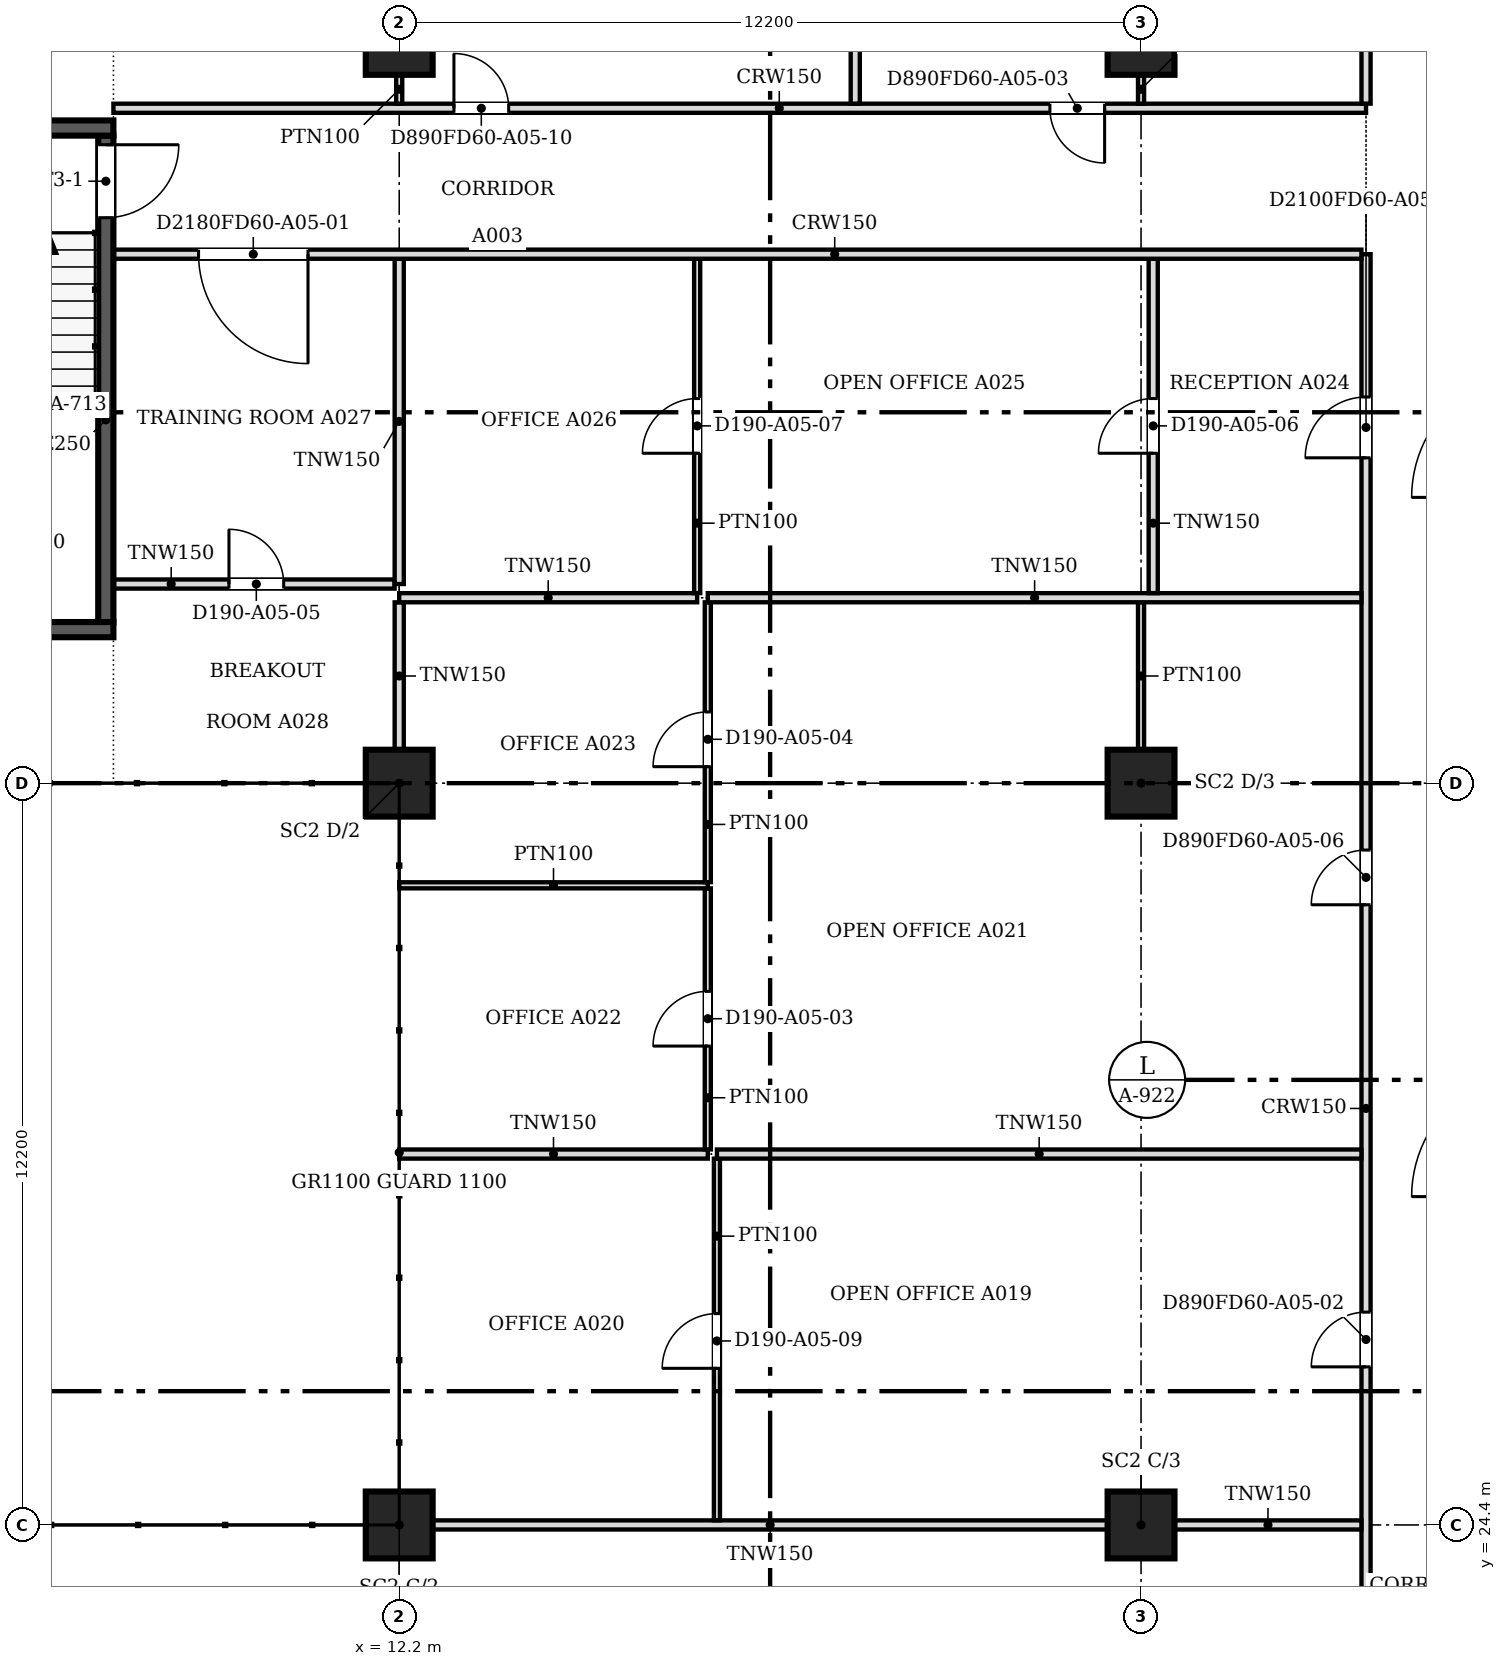
"""IFC4 building model, lengths in metres.
Left out: names, types, materials, properties, quantities, classifications, styles, units other than length and angle.
Written with IfcOpenShell. Run it as: python <this file> out.ifc"""

import sys

from ifc_helpers import new_model, si_unit, direction, frame, frame_2d, origin, origin_2d, place, context, subcontext, project, spatial, rectangle, extrude, source, transform, mapped, element, fill, save


model = new_model("IFC4")
c1 = context("Model", 3, precision=1e-05, world=origin(), true_north=direction((0.0, 1.0)))
c2 = subcontext(c1, "Body", "Model", "MODEL_VIEW")
j1 = project(units=[si_unit("LENGTHUNIT", "METRE"), si_unit("PLANEANGLEUNIT", "RADIAN")], contexts=[c1])
p1 = place(None, origin())
s1 = spatial("IfcSite", under=j1, at=p1, CompositionType="ELEMENT")
p2 = place(p1, origin())
s2 = spatial("IfcBuilding", under=s1, at=p2, CompositionType="ELEMENT")
p3 = place(p2, frame((0.0, 0.0, 60.0)))
s3 = spatial("IfcBuildingStorey", under=s2, at=p3, CompositionType="ELEMENT", Elevation=60.0)
for number, where, z_axis, x_axis in (
    (1, (12.2, 24.4, 0.0), (0.0, 0.0, 1.0), (1.0, 0.0, 0.0)),
    (2, (12.2, 36.6, 0.0), (0.0, 0.0, 1.0), (1.0, 0.0, 0.0)),
    (3, (12.2, 48.8, 0.0), (0.0, 0.0, 1.0), (1.0, 0.0, 0.0)),
    (4, (24.4, 24.4, 0.0), (0.0, 0.0, 1.0), (1.0, 0.0, 0.0)),
    (5, (24.4, 36.6, 0.0), (0.0, 0.0, 1.0), (1.0, 0.0, 0.0)),
    (6, (24.4, 48.8, 0.0), (0.0, 0.0, 1.0), (1.0, 0.0, 0.0)),
):
    element("IfcColumn", number, at=place(p3, frame(where, z_axis=z_axis, x_axis=x_axis)), inside=s3, PredefinedType="COLUMN", context=c2, shape_type="SweptSolid", body=[
        extrude(rectangle(XDim=1.1, YDim=1.1, at=origin_2d()), origin(), (0.0, 0.0, 1.0), 3.5),
    ])
for number, where, z_axis, x_axis in (
    (7, (7.5, 39.125, 0.0), (0.0, 0.0, 1.0), (-1.0, 0.0, 0.0)),
    (8, (3.6, 47.375, 0.0), (0.0, 0.0, 1.0), (1.0, 0.0, 0.0)),
):
    element("IfcWall", number, at=place(p3, frame(where, z_axis=z_axis, x_axis=x_axis)), inside=s3, PredefinedType="SOLIDWALL", context=c2, shape_type="SweptSolid", body=[
        extrude(rectangle(XDim=3.9, YDim=0.25, at=frame_2d((1.95, 0.0))), origin(), (0.0, 0.0, 1.0), 3.8),
    ])
p4 = place(p3, frame((7.375, 47.25, 0.0), z_axis=(0.0, 0.0, 1.0), x_axis=(0.0, -1.0, 0.0)))
e9 = element("IfcWall", 9, at=p4, inside=s3, PredefinedType="SOLIDWALL", context=c2, shape_type="SweptSolid", body=[
    extrude(rectangle(XDim=8.0, YDim=0.25, at=frame_2d((4.0, 0.0))), origin(), (0.0, 0.0, 1.0), 3.8),
])
m1 = source(origin(), c2, "Body", "SweptSolid", [
    extrude(rectangle(XDim=1.2, YDim=2.1, at=frame_2d((0.6, 1.05))), frame((0.0, 0.135, 0.0), z_axis=(0.0, -1.0, 0.0), x_axis=(1.0, 0.0, 0.0)), (0.0, 0.0, 1.0), 0.27),
])
p5 = place(p4, frame((0.15, 0.0, 0.0)))
e10 = element("IfcOpeningElement", 10, at=p5, cuts=e9, PredefinedType="OPENING", context=c2, shape_type="MappedRepresentation", body=[
    mapped(m1, transform((0.0, 0.0, 0.0), scale=1.0)),
])
p6 = place(p3, frame((28.1, 18.8, 0.0), z_axis=(0.0, 0.0, 1.0), x_axis=(0.0, 1.0, 0.0)))
e11 = element("IfcWall", 11, at=p6, inside=s3, PredefinedType="PARTITIONING", context=c2, shape_type="SweptSolid", body=[
    extrude(rectangle(XDim=26.5, YDim=0.15, at=frame_2d((13.25, 0.0))), origin(), (0.0, 0.0, 1.0), 2.888),
])
m2 = source(origin(), c2, "Body", "SweptSolid", [
    extrude(rectangle(XDim=0.9, YDim=2.1, at=frame_2d((0.45, 1.05))), frame((0.0, 0.085, 0.0), z_axis=(0.0, -1.0, 0.0), x_axis=(1.0, 0.0, 0.0)), (0.0, 0.0, 1.0), 0.17),
])
p7 = place(p6, frame((1.1, 0.0, 0.0)))
e12 = element("IfcOpeningElement", 12, at=p7, cuts=e11, PredefinedType="OPENING", context=c2, shape_type="MappedRepresentation", body=[
    mapped(m2, transform((0.0, 0.0, 0.0), scale=1.0)),
])
m3 = source(origin(), c2, "Body", "SweptSolid", [
    extrude(rectangle(XDim=1.0, YDim=2.1, at=frame_2d((0.5, 1.05))), frame((0.0, 0.085, 0.0), z_axis=(0.0, -1.0, 0.0), x_axis=(1.0, 0.0, 0.0)), (0.0, 0.0, 1.0), 0.17),
])
p8 = place(p6, frame((23.151, 0.0, 0.0)))
e13 = element("IfcOpeningElement", 13, at=p8, cuts=e11, PredefinedType="OPENING", context=c2, shape_type="MappedRepresentation", body=[
    mapped(m3, transform((0.0, 0.0, 0.0), scale=1.0)),
])
p9 = place(p6, frame((8.2, 0.0, 0.0)))
e14 = element("IfcOpeningElement", 14, at=p9, cuts=e11, PredefinedType="OPENING", context=c2, shape_type="MappedRepresentation", body=[
    mapped(m2, transform((0.0, 0.0, 0.0), scale=1.0)),
])
p10 = place(p6, frame((15.8, 0.0, 0.0)))
e15 = element("IfcOpeningElement", 15, at=p10, cuts=e11, PredefinedType="OPENING", context=c2, shape_type="MappedRepresentation", body=[
    mapped(m2, transform((0.0, 0.0, 0.0), scale=1.0)),
])
p11 = place(p3, frame((12.751, 24.4, 0.0), z_axis=(0.0, 0.0, 1.0), x_axis=(1.0, 0.0, 0.0)))
e16 = element("IfcWall", 16, at=p11, inside=s3, PredefinedType="PARTITIONING", context=c2, shape_type="SweptSolid", body=[
    extrude(rectangle(XDim=11.098, YDim=0.15, at=frame_2d((5.549, 0.0))), origin(), (0.0, 0.0, 1.0), 2.888),
])
p12 = place(p3, frame((24.951, 24.4, 0.0), z_axis=(0.0, 0.0, 1.0), x_axis=(1.0, 0.0, 0.0)))
e17 = element("IfcWall", 17, at=p12, inside=s3, PredefinedType="PARTITIONING", context=c2, shape_type="SweptSolid", body=[
    extrude(rectangle(XDim=3.073, YDim=0.15, at=frame_2d((1.537, 0.0))), origin(), (0.0, 0.0, 1.0), 2.888),
])
p13 = place(p3, frame((17.425, 24.476, 0.0), z_axis=(0.0, 0.0, 1.0), x_axis=(0.0, 1.0, 0.0)))
e18 = element("IfcWall", 18, at=p13, inside=s3, PredefinedType="PARTITIONING", context=c2, shape_type="SweptSolid", body=[
    extrude(rectangle(XDim=5.948, YDim=0.1, at=frame_2d((2.974, 0.0))), origin(), (0.0, 0.0, 1.0), 2.888),
])
m4 = source(origin(), c2, "Body", "SweptSolid", [
    extrude(rectangle(XDim=0.9, YDim=2.1, at=frame_2d((0.45, 1.05))), frame((0.0, 0.06, 0.0), z_axis=(0.0, -1.0, 0.0), x_axis=(1.0, 0.0, 0.0)), (0.0, 0.0, 1.0), 0.12),
])
p14 = place(p13, frame((2.5, 0.0, 0.0)))
e19 = element("IfcOpeningElement", 19, at=p14, cuts=e18, PredefinedType="OPENING", context=c2, shape_type="MappedRepresentation", body=[
    mapped(m4, transform((0.0, 0.0, 0.0), scale=1.0)),
])
p15 = place(p3, frame((12.2, 30.5, 0.0), z_axis=(0.0, 0.0, 1.0), x_axis=(1.0, 0.0, 0.0)))
e20 = element("IfcWall", 20, at=p15, inside=s3, PredefinedType="PARTITIONING", context=c2, shape_type="SweptSolid", body=[
    extrude(rectangle(XDim=5.075, YDim=0.15, at=frame_2d((2.538, 0.0))), origin(), (0.0, 0.0, 1.0), 2.888),
])
p16 = place(p3, frame((17.425, 30.5, 0.0), z_axis=(0.0, 0.0, 1.0), x_axis=(1.0, 0.0, 0.0)))
e21 = element("IfcWall", 21, at=p16, inside=s3, PredefinedType="PARTITIONING", context=c2, shape_type="SweptSolid", body=[
    extrude(rectangle(XDim=10.599, YDim=0.15, at=frame_2d((5.299, 0.0))), origin(), (0.0, 0.0, 1.0), 2.888),
])
p17 = place(p3, frame((17.275, 30.576, 0.0), z_axis=(0.0, 0.0, 1.0), x_axis=(0.0, 1.0, 0.0)))
e22 = element("IfcWall", 22, at=p17, inside=s3, PredefinedType="PARTITIONING", context=c2, shape_type="SweptSolid", body=[
    extrude(rectangle(XDim=4.293, YDim=0.1, at=frame_2d((2.147, 0.0))), origin(), (0.0, 0.0, 1.0), 2.888),
])
p18 = place(p17, frame((1.7, 0.0, 0.0)))
e23 = element("IfcOpeningElement", 23, at=p18, cuts=e22, PredefinedType="OPENING", context=c2, shape_type="MappedRepresentation", body=[
    mapped(m4, transform((0.0, 0.0, 0.0), scale=1.0)),
])
p19 = place(p3, frame((12.2, 34.92, 0.0), z_axis=(0.0, 0.0, 1.0), x_axis=(1.0, 0.0, 0.0)))
e24 = element("IfcWall", 24, at=p19, inside=s3, PredefinedType="PARTITIONING", context=c2, shape_type="SweptSolid", body=[
    extrude(rectangle(XDim=5.075, YDim=0.1, at=frame_2d((2.538, 0.0))), origin(), (0.0, 0.0, 1.0), 2.888),
])
p20 = place(p3, frame((17.275, 34.971, 0.0), z_axis=(0.0, 0.0, 1.0), x_axis=(0.0, 1.0, 0.0)))
e25 = element("IfcWall", 25, at=p20, inside=s3, PredefinedType="PARTITIONING", context=c2, shape_type="SweptSolid", body=[
    extrude(rectangle(XDim=4.603, YDim=0.1, at=frame_2d((2.301, 0.0))), origin(), (0.0, 0.0, 1.0), 2.888),
])
p21 = place(p20, frame((1.9, 0.0, 0.0)))
e26 = element("IfcOpeningElement", 26, at=p21, cuts=e25, PredefinedType="OPENING", context=c2, shape_type="MappedRepresentation", body=[
    mapped(m4, transform((0.0, 0.0, 0.0), scale=1.0)),
])
p22 = place(p3, frame((12.2, 37.151, 0.0), z_axis=(0.0, 0.0, 1.0), x_axis=(0.0, 1.0, 0.0)))
e27 = element("IfcWall", 27, at=p22, inside=s3, PredefinedType="PARTITIONING", context=c2, shape_type="SweptSolid", body=[
    extrude(rectangle(XDim=2.423, YDim=0.15, at=frame_2d((1.211, 0.0))), origin(), (0.0, 0.0, 1.0), 2.888),
])
p23 = place(p3, frame((24.4, 37.15, 0.0), z_axis=(0.0, 0.0, 1.0), x_axis=(0.0, 1.0, 0.0)))
e28 = element("IfcWall", 28, at=p23, inside=s3, PredefinedType="PARTITIONING", context=c2, shape_type="SweptSolid", body=[
    extrude(rectangle(XDim=2.425, YDim=0.1, at=frame_2d((1.212, 0.0))), origin(), (0.0, 0.0, 1.0), 2.888),
])
p24 = place(p3, frame((12.2, 39.65, 0.0), z_axis=(0.0, 0.0, 1.0), x_axis=(1.0, 0.0, 0.0)))
e29 = element("IfcWall", 29, at=p24, inside=s3, PredefinedType="PARTITIONING", context=c2, shape_type="SweptSolid", body=[
    extrude(rectangle(XDim=4.9, YDim=0.15, at=frame_2d((2.45, 0.0))), origin(), (0.0, 0.0, 1.0), 2.888),
])
p25 = place(p3, frame((17.275, 39.65, 0.0), z_axis=(0.0, 0.0, 1.0), x_axis=(1.0, 0.0, 0.0)))
e30 = element("IfcWall", 30, at=p25, inside=s3, PredefinedType="PARTITIONING", context=c2, shape_type="SweptSolid", body=[
    extrude(rectangle(XDim=10.749, YDim=0.15, at=frame_2d((5.375, 0.0))), origin(), (0.0, 0.0, 1.0), 2.888),
])
p26 = place(p3, frame((17.1, 39.726, 0.0), z_axis=(0.0, 0.0, 1.0), x_axis=(0.0, 1.0, 0.0)))
e31 = element("IfcWall", 31, at=p26, inside=s3, PredefinedType="PARTITIONING", context=c2, shape_type="SweptSolid", body=[
    extrude(rectangle(XDim=5.498, YDim=0.1, at=frame_2d((2.749, 0.0))), origin(), (0.0, 0.0, 1.0), 2.888),
])
p27 = place(p26, frame((2.3, 0.0, 0.0)))
e32 = element("IfcOpeningElement", 32, at=p27, cuts=e31, PredefinedType="OPENING", context=c2, shape_type="MappedRepresentation", body=[
    mapped(m4, transform((0.0, 0.0, 0.0), scale=1.0)),
])
p28 = place(p3, frame((24.6, 39.726, 0.0), z_axis=(0.0, 0.0, 1.0), x_axis=(0.0, 1.0, 0.0)))
e33 = element("IfcWall", 33, at=p28, inside=s3, PredefinedType="PARTITIONING", context=c2, shape_type="SweptSolid", body=[
    extrude(rectangle(XDim=5.498, YDim=0.15, at=frame_2d((2.749, 0.0))), origin(), (0.0, 0.0, 1.0), 2.888),
])
p29 = place(p28, frame((2.3, 0.0, 0.0)))
e34 = element("IfcOpeningElement", 34, at=p29, cuts=e33, PredefinedType="OPENING", context=c2, shape_type="MappedRepresentation", body=[
    mapped(m2, transform((0.0, 0.0, 0.0), scale=1.0)),
])
p30 = place(p3, frame((12.124, 39.875, 0.0), z_axis=(0.0, 0.0, 1.0), x_axis=(-1.0, 0.0, 0.0)))
e35 = element("IfcWall", 35, at=p30, inside=s3, PredefinedType="PARTITIONING", context=c2, shape_type="SweptSolid", body=[
    extrude(rectangle(XDim=4.624, YDim=0.15, at=frame_2d((2.312, 0.0))), origin(), (0.0, 0.0, 1.0), 2.888),
])
p31 = place(p30, frame((1.824, 0.0, 0.0)))
e36 = element("IfcOpeningElement", 36, at=p31, cuts=e35, PredefinedType="OPENING", context=c2, shape_type="MappedRepresentation", body=[
    mapped(m2, transform((0.0, 0.0, 0.0), scale=1.0)),
])
p32 = place(p3, frame((12.2, 39.875, 0.0), z_axis=(0.0, 0.0, 1.0), x_axis=(0.0, 1.0, 0.0)))
e37 = element("IfcWall", 37, at=p32, inside=s3, PredefinedType="PARTITIONING", context=c2, shape_type="SweptSolid", body=[
    extrude(rectangle(XDim=5.349, YDim=0.15, at=frame_2d((2.675, 0.0))), origin(), (0.0, 0.0, 1.0), 2.888),
])
p33 = place(p3, frame((28.024, 45.3, 0.0), z_axis=(0.0, 0.0, 1.0), x_axis=(-1.0, 0.0, 0.0)))
e38 = element("IfcWall", 38, at=p33, inside=s3, PredefinedType="PARTITIONING", context=c2, shape_type="SweptSolid", body=[
    extrude(rectangle(XDim=20.524, YDim=0.15, at=frame_2d((10.262, 0.0))), origin(), (0.0, 0.0, 1.0), 2.888),
])
m5 = source(origin(), c2, "Body", "SweptSolid", [
    extrude(rectangle(XDim=1.8, YDim=2.1, at=frame_2d((0.9, 1.05))), frame((0.0, 0.085, 0.0), z_axis=(0.0, -1.0, 0.0), x_axis=(1.0, 0.0, 0.0)), (0.0, 0.0, 1.0), 0.17),
])
p34 = place(p33, frame((17.324, 0.0, 0.0)))
e39 = element("IfcOpeningElement", 39, at=p34, cuts=e38, PredefinedType="OPENING", context=c2, shape_type="MappedRepresentation", body=[
    mapped(m5, transform((0.0, 0.0, 0.0), scale=1.0)),
])
p35 = place(p3, frame((7.5, 47.7, 0.0), z_axis=(0.0, 0.0, 1.0), x_axis=(1.0, 0.0, 0.0)))
e40 = element("IfcWall", 40, at=p35, inside=s3, PredefinedType="PARTITIONING", context=c2, shape_type="SweptSolid", body=[
    extrude(rectangle(XDim=20.6, YDim=0.15, at=frame_2d((10.3, 0.0))), origin(), (0.0, 0.0, 1.0), 2.888),
])
p36 = place(p35, frame((15.401, 0.0, 0.0)))
e41 = element("IfcOpeningElement", 41, at=p36, cuts=e40, PredefinedType="OPENING", context=c2, shape_type="MappedRepresentation", body=[
    mapped(m2, transform((0.0, 0.0, 0.0), scale=1.0)),
])
p37 = place(p35, frame((5.6, 0.0, 0.0)))
e42 = element("IfcOpeningElement", 42, at=p37, cuts=e40, PredefinedType="OPENING", context=c2, shape_type="MappedRepresentation", body=[
    mapped(m2, transform((0.0, 0.0, 0.0), scale=1.0)),
])
p38 = place(p3, frame((19.7, 47.776, 0.0), z_axis=(0.0, 0.0, 1.0), x_axis=(0.0, 1.0, 0.0)))
e43 = element("IfcWall", 43, at=p38, inside=s3, PredefinedType="PARTITIONING", context=c2, shape_type="SweptSolid", body=[
    extrude(rectangle(XDim=6.624, YDim=0.15, at=frame_2d((3.312, 0.0))), origin(), (0.0, 0.0, 1.0), 2.888),
])
p39 = place(p3, frame((28.1, 47.776, 0.0), z_axis=(0.0, 0.0, 1.0), x_axis=(0.0, 1.0, 0.0)))
e44 = element("IfcWall", 44, at=p39, inside=s3, PredefinedType="PARTITIONING", context=c2, shape_type="SweptSolid", body=[
    extrude(rectangle(XDim=3.324, YDim=0.15, at=frame_2d((1.662, 0.0))), origin(), (0.0, 0.0, 1.0), 2.888),
])
for number, where, z_axis, x_axis in (
    (45, (12.2, 48.25, 0.0), (0.0, 0.0, 1.0), (0.0, -1.0, 0.0)),
    (46, (24.4, 48.25, 0.0), (0.0, 0.0, 1.0), (0.0, -1.0, 0.0)),
):
    element("IfcWall", number, at=place(p3, frame(where, z_axis=z_axis, x_axis=x_axis)), inside=s3, PredefinedType="PARTITIONING", context=c2, shape_type="SweptSolid", body=[
        extrude(rectangle(XDim=0.475, YDim=0.1, at=frame_2d((0.238, 0.0))), origin(), (0.0, 0.0, 1.0), 2.888),
    ])
m6 = source(origin(), c2, "Body", "SweptSolid", [
    extrude(rectangle(XDim=1.2, YDim=2.1, at=frame_2d((0.6, 1.05))), frame((0.0, 0.025, 0.0), z_axis=(0.0, -1.0, 0.0), x_axis=(1.0, 0.0, 0.0)), (0.0, 0.0, 1.0), 0.05),
])
p40 = place(p5, origin())
e47 = element("IfcDoor", 47, at=p40, inside=s3, OperationType="SINGLE_SWING_LEFT", PredefinedType="DOOR", context=c2, shape_type="MappedRepresentation", body=[
    mapped(m6, transform((0.0, 0.0, 0.0), scale=1.0)),
])
fill(e10, e47)
m7 = source(origin(), c2, "Body", "SweptSolid", [
    extrude(rectangle(XDim=0.9, YDim=2.1, at=frame_2d((0.45, 1.05))), frame((0.0, 0.025, 0.0), z_axis=(0.0, -1.0, 0.0), x_axis=(1.0, 0.0, 0.0)), (0.0, 0.0, 1.0), 0.05),
])
p41 = place(p18, origin())
e48 = element("IfcDoor", 48, at=p41, inside=s3, OperationType="SINGLE_SWING_LEFT", PredefinedType="DOOR", context=c2, shape_type="MappedRepresentation", body=[
    mapped(m7, transform((0.0, 0.0, 0.0), scale=1.0)),
])
fill(e23, e48)
p42 = place(p21, origin())
e49 = element("IfcDoor", 49, at=p42, inside=s3, OperationType="SINGLE_SWING_LEFT", PredefinedType="DOOR", context=c2, shape_type="MappedRepresentation", body=[
    mapped(m7, transform((0.0, 0.0, 0.0), scale=1.0)),
])
fill(e26, e49)
p43 = place(p31, origin())
e50 = element("IfcDoor", 50, at=p43, inside=s3, OperationType="SINGLE_SWING_RIGHT", PredefinedType="DOOR", context=c2, shape_type="MappedRepresentation", body=[
    mapped(m7, transform((0.0, 0.0, 0.0), scale=1.0)),
])
fill(e36, e50)
m8 = source(origin(), c2, "Body", "SweptSolid", [
    extrude(rectangle(XDim=1.8, YDim=2.1, at=frame_2d((0.9, 1.05))), frame((0.0, 0.025, 0.0), z_axis=(0.0, -1.0, 0.0), x_axis=(1.0, 0.0, 0.0)), (0.0, 0.0, 1.0), 0.05),
])
p44 = place(p34, origin())
e51 = element("IfcDoor", 51, at=p44, inside=s3, OperationType="DOUBLE_DOOR_SINGLE_SWING", PredefinedType="DOOR", context=c2, shape_type="MappedRepresentation", body=[
    mapped(m8, transform((0.0, 0.0, 0.0), scale=1.0)),
])
fill(e39, e51)
p45 = place(p29, origin())
e52 = element("IfcDoor", 52, at=p45, inside=s3, OperationType="SINGLE_SWING_LEFT", PredefinedType="DOOR", context=c2, shape_type="MappedRepresentation", body=[
    mapped(m7, transform((0.0, 0.0, 0.0), scale=1.0)),
])
fill(e34, e52)
p46 = place(p27, origin())
e53 = element("IfcDoor", 53, at=p46, inside=s3, OperationType="SINGLE_SWING_LEFT", PredefinedType="DOOR", context=c2, shape_type="MappedRepresentation", body=[
    mapped(m7, transform((0.0, 0.0, 0.0), scale=1.0)),
])
fill(e32, e53)
m9 = source(origin(), c2, "Body", "SweptSolid", [
    extrude(rectangle(XDim=1.0, YDim=2.1, at=frame_2d((0.5, 1.05))), frame((0.0, 0.025, 0.0), z_axis=(0.0, -1.0, 0.0), x_axis=(1.0, 0.0, 0.0)), (0.0, 0.0, 1.0), 0.05),
])
p47 = place(p8, origin())
e54 = element("IfcDoor", 54, at=p47, inside=s3, OperationType="SINGLE_SWING_LEFT", PredefinedType="DOOR", context=c2, shape_type="MappedRepresentation", body=[
    mapped(m9, transform((0.0, 0.0, 0.0), scale=1.0)),
])
fill(e13, e54)
p48 = place(p14, origin())
e55 = element("IfcDoor", 55, at=p48, inside=s3, OperationType="SINGLE_SWING_LEFT", PredefinedType="DOOR", context=c2, shape_type="MappedRepresentation", body=[
    mapped(m7, transform((0.0, 0.0, 0.0), scale=1.0)),
])
fill(e19, e55)
p49 = place(p9, origin())
e56 = element("IfcDoor", 56, at=p49, inside=s3, OperationType="SINGLE_SWING_LEFT", PredefinedType="DOOR", context=c2, shape_type="MappedRepresentation", body=[
    mapped(m7, transform((0.0, 0.0, 0.0), scale=1.0)),
])
fill(e14, e56)
p50 = place(p36, origin())
e57 = element("IfcDoor", 57, at=p50, inside=s3, OperationType="SINGLE_SWING_RIGHT", PredefinedType="DOOR", context=c2, shape_type="MappedRepresentation", body=[
    mapped(m7, transform((0.0, 0.0, 0.0), scale=1.0)),
])
fill(e41, e57)
p51 = place(p10, origin())
e58 = element("IfcDoor", 58, at=p51, inside=s3, OperationType="SINGLE_SWING_LEFT", PredefinedType="DOOR", context=c2, shape_type="MappedRepresentation", body=[
    mapped(m7, transform((0.0, 0.0, 0.0), scale=1.0)),
])
fill(e15, e58)
p52 = place(p37, origin())
e59 = element("IfcDoor", 59, at=p52, inside=s3, OperationType="SINGLE_SWING_LEFT", PredefinedType="DOOR", context=c2, shape_type="MappedRepresentation", body=[
    mapped(m7, transform((0.0, 0.0, 0.0), scale=1.0)),
])
fill(e42, e59)
save(model, sys.argv[1])
